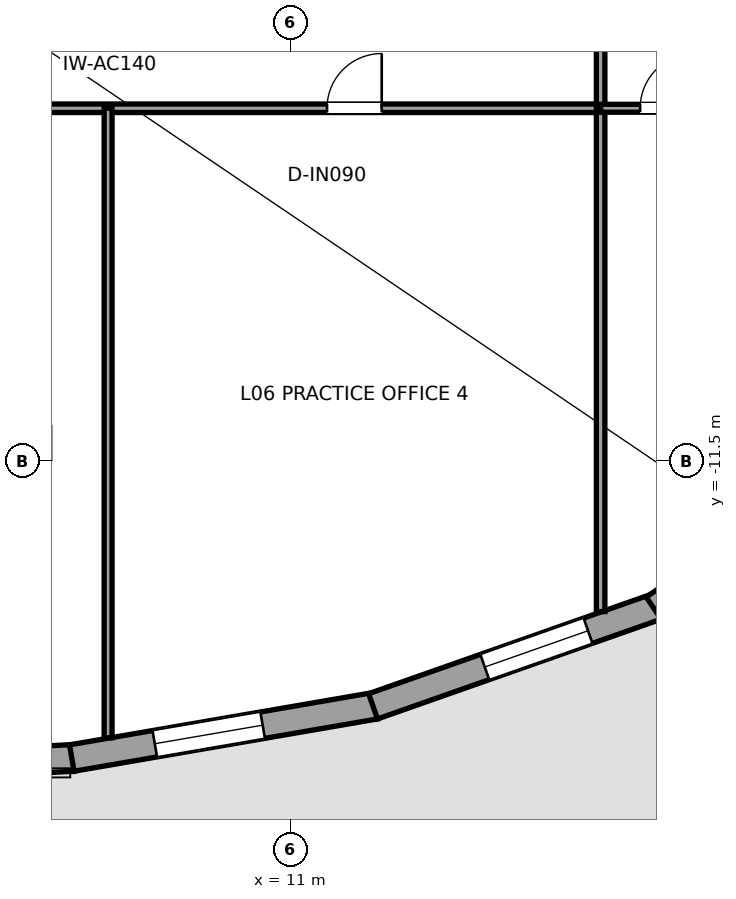
"""IFC4 building model, lengths in metres.
Left out: names, types, materials, properties, quantities, classifications, styles, units other than length and angle.
Written with IfcOpenShell. Run it as: python <this file> out.ifc"""

import sys

from ifc_helpers import new_model, si_unit, direction, frame, frame_2d, origin, place, context, subcontext, project, spatial, rectangle, extrude, element, fill, save


model = new_model("IFC4")
c1 = context("Model", 3, precision=1e-05, world=origin(), true_north=direction((0.0, 1.0)))
c2 = subcontext(c1, "Body", "Model", "MODEL_VIEW")
j1 = project(units=[si_unit("LENGTHUNIT", "METRE"), si_unit("PLANEANGLEUNIT", "RADIAN")], contexts=[c1])
p1 = place(None, origin())
s1 = spatial("IfcSite", under=j1, at=p1, CompositionType="ELEMENT")
p2 = place(p1, origin())
s2 = spatial("IfcBuilding", under=s1, at=p2, CompositionType="ELEMENT")
p3 = place(p2, frame((0.0, 0.0, 27.0)))
s3 = spatial("IfcBuildingStorey", under=s2, at=p3, CompositionType="ELEMENT", Elevation=27.0)
p4 = place(p3, frame((7.428, -16.383, 0.0), z_axis=(0.0, 0.0, 1.0), x_axis=(-0.998501456853, -0.054725137396, 0.0)))
e1 = element("IfcWall", 1, at=p4, inside=s3, PredefinedType="STANDARD", context=c2, shape_type="SweptSolid", body=[
    extrude(rectangle(XDim=4.992, YDim=0.44, at=frame_2d((2.496, 0.0))), origin(), (0.0, 0.0, 1.0), 2.533),
])
p5 = place(p4, frame((1.247, 0.0, 0.65)))
e2 = element("IfcOpeningElement", 2, at=p5, cuts=e1, PredefinedType="OPENING", context=c2, shape_type="SweptSolid", body=[
    extrude(rectangle(XDim=1.8, YDim=1.7, at=frame_2d((0.9, 0.85))), frame((0.0, 0.23, 0.0), z_axis=(0.0, -1.0, 0.0), x_axis=(1.0, 0.0, 0.0)), (0.0, 0.0, 1.0), 0.46),
])
p6 = place(p3, frame((12.393, -15.526, 0.0), z_axis=(0.0, 0.0, 1.0), x_axis=(-0.985480149415, -0.169790680278, 0.0)))
e3 = element("IfcWall", 3, at=p6, inside=s3, PredefinedType="STANDARD", context=c2, shape_type="SweptSolid", body=[
    extrude(rectangle(XDim=5.064, YDim=0.44, at=frame_2d((2.532, 0.0))), origin(), (0.0, 0.0, 1.0), 2.533),
])
p7 = place(p6, frame((1.879, 0.0, 0.65)))
e4 = element("IfcOpeningElement", 4, at=p7, cuts=e3, PredefinedType="OPENING", context=c2, shape_type="SweptSolid", body=[
    extrude(rectangle(XDim=1.8, YDim=1.7, at=frame_2d((0.9, 0.85))), frame((0.0, 0.23, 0.0), z_axis=(0.0, -1.0, 0.0), x_axis=(1.0, 0.0, 0.0)), (0.0, 0.0, 1.0), 0.46),
])
p8 = place(p3, frame((17.023, -13.894, 0.0), z_axis=(0.0, 0.0, 1.0), x_axis=(-0.94336246541, -0.331763860082, 0.0)))
e5 = element("IfcWall", 5, at=p8, inside=s3, PredefinedType="STANDARD", context=c2, shape_type="SweptSolid", body=[
    extrude(rectangle(XDim=4.946, YDim=0.44, at=frame_2d((2.473, 0.0))), origin(), (0.0, 0.0, 1.0), 2.529),
])
p9 = place(p8, frame((1.198, 0.0, 0.65)))
e6 = element("IfcOpeningElement", 6, at=p9, cuts=e5, PredefinedType="OPENING", context=c2, shape_type="SweptSolid", body=[
    extrude(rectangle(XDim=1.8, YDim=1.7, at=frame_2d((0.9, 0.85))), frame((0.0, 0.23, 0.0), z_axis=(0.0, -1.0, 0.0), x_axis=(1.0, 0.0, 0.0)), (0.0, 0.0, 1.0), 0.46),
])
p10 = place(p3, frame((20.709, -11.391, 0.0), z_axis=(0.0, 0.0, 1.0), x_axis=(-0.828124546302, -0.560544142608, 0.0)))
e7 = element("IfcWall", 7, at=p10, inside=s3, PredefinedType="STANDARD", context=c2, shape_type="SweptSolid", body=[
    extrude(rectangle(XDim=4.511, YDim=0.44, at=frame_2d((2.255, 0.0))), origin(), (0.0, 0.0, 1.0), 2.533),
])
p11 = place(p10, frame((1.724, 0.0, 0.65)))
e8 = element("IfcOpeningElement", 8, at=p11, cuts=e7, PredefinedType="OPENING", context=c2, shape_type="SweptSolid", body=[
    extrude(rectangle(XDim=1.8, YDim=1.7, at=frame_2d((0.9, 0.85))), frame((0.0, 0.23, 0.0), z_axis=(0.0, -1.0, 0.0), x_axis=(1.0, 0.0, 0.0)), (0.0, 0.0, 1.0), 0.46),
])
p12 = place(p3, frame((-16.1, -5.7, 0.0), z_axis=(0.0, 0.0, 1.0), x_axis=(1.0, 0.0, 0.0)))
e9 = element("IfcWall", 9, at=p12, inside=s3, PredefinedType="PARTITIONING", context=c2, shape_type="SweptSolid", body=[
    extrude(rectangle(XDim=32.2, YDim=0.14, at=frame_2d((16.1, 0.0))), origin(), (0.0, 0.0, 1.0), 2.853),
])
p13 = place(p12, frame((3.6, 0.0, 0.0)))
e10 = element("IfcOpeningElement", 10, at=p13, cuts=e9, PredefinedType="OPENING", context=c2, shape_type="SweptSolid", body=[
    extrude(rectangle(XDim=0.9, YDim=2.1, at=frame_2d((0.45, 1.05))), frame((0.0, 0.08, 0.0), z_axis=(0.0, -1.0, 0.0), x_axis=(1.0, 0.0, 0.0)), (0.0, 0.0, 1.0), 0.16),
])
p14 = place(p12, frame((11.35, 0.0, 0.0)))
e11 = element("IfcOpeningElement", 11, at=p14, cuts=e9, PredefinedType="OPENING", context=c2, shape_type="SweptSolid", body=[
    extrude(rectangle(XDim=1.5, YDim=2.15, at=frame_2d((0.75, 1.075))), frame((0.0, 0.08, 0.0), z_axis=(0.0, -1.0, 0.0), x_axis=(1.0, 0.0, 0.0)), (0.0, 0.0, 1.0), 0.16),
])
p15 = place(p12, frame((19.65, 0.0, 0.0)))
e12 = element("IfcOpeningElement", 12, at=p15, cuts=e9, PredefinedType="OPENING", context=c2, shape_type="SweptSolid", body=[
    extrude(rectangle(XDim=0.9, YDim=2.1, at=frame_2d((0.45, 1.05))), frame((0.0, 0.08, 0.0), z_axis=(0.0, -1.0, 0.0), x_axis=(1.0, 0.0, 0.0)), (0.0, 0.0, 1.0), 0.16),
])
p16 = place(p12, frame((27.7, 0.0, 0.0)))
e13 = element("IfcOpeningElement", 13, at=p16, cuts=e9, PredefinedType="OPENING", context=c2, shape_type="SweptSolid", body=[
    extrude(rectangle(XDim=0.9, YDim=2.1, at=frame_2d((0.45, 1.05))), frame((0.0, 0.08, 0.0), z_axis=(0.0, -1.0, 0.0), x_axis=(1.0, 0.0, 0.0)), (0.0, 0.0, 1.0), 0.16),
])
p17 = place(p3, frame((16.1, -13.977, 0.0), z_axis=(0.0, 0.0, 1.0), x_axis=(0.0, 1.0, 0.0)))
e14 = element("IfcWall", 14, at=p17, inside=s3, PredefinedType="PARTITIONING", context=c2, shape_type="SweptSolid", body=[
    extrude(rectangle(XDim=19.827, YDim=0.14, at=frame_2d((9.914, 0.0))), origin(), (0.0, 0.0, 1.0), 2.841),
])
p18 = place(p17, frame((10.177, 0.0, 0.0)))
e15 = element("IfcOpeningElement", 15, at=p18, cuts=e14, PredefinedType="OPENING", context=c2, shape_type="SweptSolid", body=[
    extrude(rectangle(XDim=0.9, YDim=2.1, at=frame_2d((0.45, 1.05))), frame((0.0, 0.08, 0.0), z_axis=(0.0, -1.0, 0.0), x_axis=(1.0, 0.0, 0.0)), (0.0, 0.0, 1.0), 0.16),
])
p19 = place(p17, frame((15.952, 0.0, 0.0)))
e16 = element("IfcOpeningElement", 16, at=p19, cuts=e14, PredefinedType="OPENING", context=c2, shape_type="SweptSolid", body=[
    extrude(rectangle(XDim=0.9, YDim=2.1, at=frame_2d((0.45, 1.05))), frame((0.0, 0.08, 0.0), z_axis=(0.0, -1.0, 0.0), x_axis=(1.0, 0.0, 0.0)), (0.0, 0.0, 1.0), 0.16),
])
p20 = place(p3, frame((8.0, -16.052, 0.0), z_axis=(0.0, 0.0, 1.0), x_axis=(0.0, 1.0, 0.0)))
e17 = element("IfcWall", 17, at=p20, inside=s3, PredefinedType="PARTITIONING", context=c2, shape_type="SweptSolid", body=[
    extrude(rectangle(XDim=10.352, YDim=0.13, at=frame_2d((5.176, 0.0))), origin(), (0.0, 0.0, 1.0), 2.853),
])
p21 = place(p3, frame((16.1, -5.7, 0.0), z_axis=(0.0, 0.0, 1.0), x_axis=(1.0, 0.0, 0.0)))
e18 = element("IfcWall", 18, at=p21, inside=s3, PredefinedType="PARTITIONING", context=c2, shape_type="SweptSolid", body=[
    extrude(rectangle(XDim=7.698, YDim=0.13, at=frame_2d((3.849, 0.0))), origin(), (0.0, 0.0, 1.0), 2.779),
])
p22 = place(p21, frame((0.65, 0.0, 0.0)))
e19 = element("IfcOpeningElement", 19, at=p22, cuts=e18, PredefinedType="OPENING", context=c2, shape_type="SweptSolid", body=[
    extrude(rectangle(XDim=0.9, YDim=2.1, at=frame_2d((0.45, 1.05))), frame((0.0, 0.075, 0.0), z_axis=(0.0, -1.0, 0.0), x_axis=(1.0, 0.0, 0.0)), (0.0, 0.0, 1.0), 0.15),
])
p23 = place(p7, origin())
e20 = element("IfcWindow", 20, at=p23, inside=s3, PartitioningType="SINGLE_PANEL", PredefinedType="WINDOW", context=c2, shape_type="SweptSolid", body=[
    extrude(rectangle(XDim=1.8, YDim=1.7, at=frame_2d((0.9, 0.85))), frame((0.0, -0.01, 0.0), z_axis=(0.0, -1.0, 0.0), x_axis=(1.0, 0.0, 0.0)), (0.0, 0.0, 1.0), 0.06),
])
fill(e4, e20)
p24 = place(p9, origin())
e21 = element("IfcWindow", 21, at=p24, inside=s3, PartitioningType="SINGLE_PANEL", PredefinedType="WINDOW", context=c2, shape_type="SweptSolid", body=[
    extrude(rectangle(XDim=1.8, YDim=1.7, at=frame_2d((0.9, 0.85))), frame((0.0, -0.01, 0.0), z_axis=(0.0, -1.0, 0.0), x_axis=(1.0, 0.0, 0.0)), (0.0, 0.0, 1.0), 0.06),
])
fill(e6, e21)
p25 = place(p16, origin())
e22 = element("IfcDoor", 22, at=p25, inside=s3, OperationType="SINGLE_SWING_RIGHT", PredefinedType="DOOR", context=c2, shape_type="SweptSolid", body=[
    extrude(rectangle(XDim=0.9, YDim=2.1, at=frame_2d((0.45, 1.05))), frame((0.0, 0.025, 0.0), z_axis=(0.0, -1.0, 0.0), x_axis=(1.0, 0.0, 0.0)), (0.0, 0.0, 1.0), 0.05),
])
fill(e13, e22)
p26 = place(p22, origin())
e23 = element("IfcDoor", 23, at=p26, inside=s3, OperationType="SINGLE_SWING_RIGHT", PredefinedType="DOOR", context=c2, shape_type="SweptSolid", body=[
    extrude(rectangle(XDim=0.9, YDim=2.1, at=frame_2d((0.45, 1.05))), frame((0.0, 0.025, 0.0), z_axis=(0.0, -1.0, 0.0), x_axis=(1.0, 0.0, 0.0)), (0.0, 0.0, 1.0), 0.05),
])
fill(e19, e23)
save(model, sys.argv[1])
